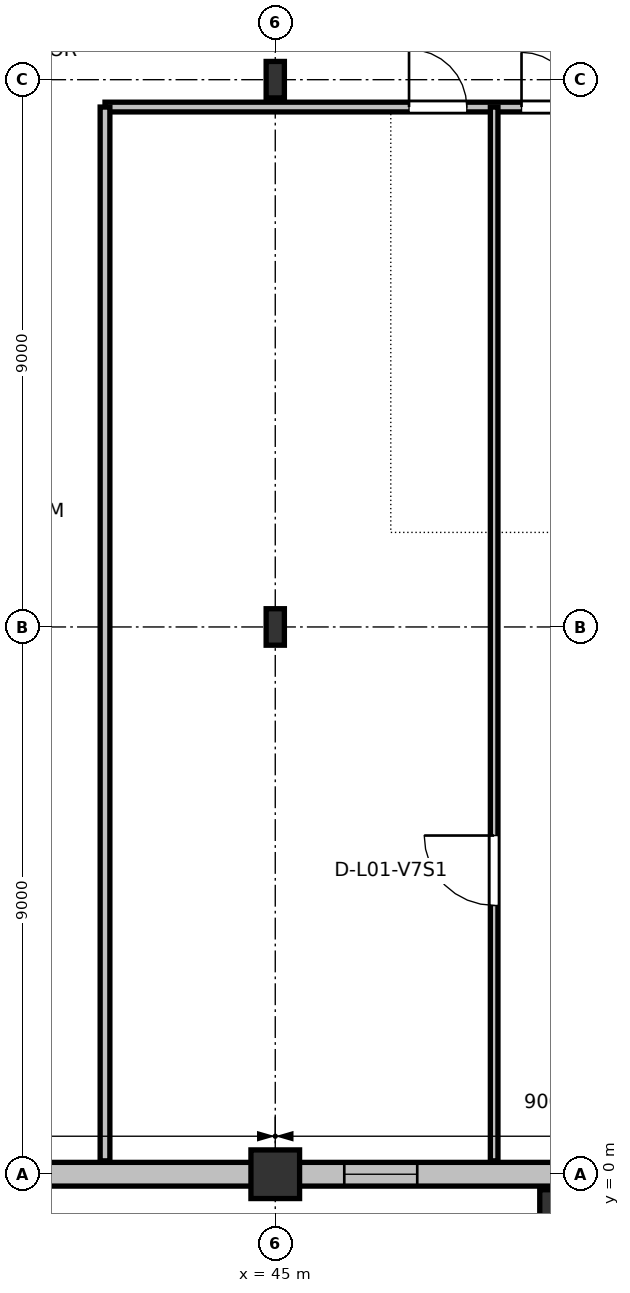
"""IFC4 building model, lengths in metres.
Left out: names, types, materials, properties, quantities, classifications, styles, units other than length and angle.
Written with IfcOpenShell. Run it as: python <this file> out.ifc"""

import sys

from ifc_helpers import new_model, si_unit, direction, frame, frame_2d, origin, origin_2d, place, context, subcontext, project, spatial, rectangle, i_section, extrude, element, fill, save


model = new_model("IFC4")
c1 = context("Model", 3, precision=1e-05, world=origin(), true_north=direction((0.0, 1.0)))
c2 = subcontext(c1, "Body", "Model", "MODEL_VIEW")
j1 = project(units=[si_unit("LENGTHUNIT", "METRE"), si_unit("PLANEANGLEUNIT", "RADIAN")], contexts=[c1])
p1 = place(None, origin())
s1 = spatial("IfcSite", under=j1, at=p1, CompositionType="ELEMENT")
p2 = place(p1, origin())
s2 = spatial("IfcBuilding", under=s1, at=p2, CompositionType="ELEMENT")
p3 = place(p2, frame((0.0, 0.0, 5.4)))
s3 = spatial("IfcBuildingStorey", under=s2, at=p3, CompositionType="ELEMENT", Elevation=5.4)
p4 = place(p3, frame((49.5, -0.48, 0.0), z_axis=(0.0, 0.0, 1.0), x_axis=(1.0, 0.0, 0.0)))
e1 = element("IfcColumn", 1, at=p4, inside=s3, PredefinedType="PILASTER", context=c2, shape_type="SweptSolid", body=[
    extrude(rectangle(XDim=0.3, YDim=0.45, at=origin_2d()), origin(), (0.0, 0.0, 1.0), 4.8),
])
p5 = place(p3, frame((45.0, 0.0, 0.0), z_axis=(0.0, 0.0, 1.0), x_axis=(1.0, 0.0, 0.0)))
e2 = element("IfcColumn", 2, at=p5, inside=s3, PredefinedType="COLUMN", context=c2, shape_type="SweptSolid", body=[
    extrude(rectangle(XDim=0.8, YDim=0.8, at=origin_2d()), origin(), (0.0, 0.0, 1.0), 4.8),
])
for number, where, z_axis, x_axis in (
    (3, (45.0, 9.0, 0.0), (0.0, 0.0, 1.0), (1.0, 0.0, 0.0)),
    (4, (45.0, 18.0, 0.0), (0.0, 0.0, 1.0), (1.0, 0.0, 0.0)),
):
    element("IfcColumn", number, at=place(p3, frame(where, z_axis=z_axis, x_axis=x_axis)), inside=s3, PredefinedType="COLUMN", context=c2, shape_type="SweptSolid", body=[
        extrude(i_section(OverallWidth=0.3, OverallDepth=0.6, WebThickness=0.015, FlangeThickness=0.03, at=origin_2d()), origin(), (0.0, 0.0, 1.0), 4.8),
    ])
p6 = place(p3, frame((36.385, 0.0, 0.0), z_axis=(0.0, 0.0, 1.0), x_axis=(1.0, 0.0, 0.0)))
e5 = element("IfcWall", 5, at=p6, inside=s3, PredefinedType="STANDARD", context=c2, shape_type="SweptSolid", body=[
    extrude(rectangle(XDim=8.23, YDim=0.39, at=frame_2d((4.115, 0.0))), origin(), (0.0, 0.0, 1.0), 3.495),
])
p7 = place(p6, frame((0.75, 0.0, 0.9)))
e6 = element("IfcOpeningElement", 6, at=p7, cuts=e5, PredefinedType="OPENING", context=c2, shape_type="SweptSolid", body=[
    extrude(rectangle(XDim=1.3, YDim=1.85, at=frame_2d((0.65, 0.925))), frame((0.0, 0.205, 0.0), z_axis=(0.0, -1.0, 0.0), x_axis=(1.0, 0.0, 0.0)), (0.0, 0.0, 1.0), 0.41),
])
p8 = place(p3, frame((45.385, 0.0, 0.0), z_axis=(0.0, 0.0, 1.0), x_axis=(1.0, 0.0, 0.0)))
e7 = element("IfcWall", 7, at=p8, inside=s3, PredefinedType="STANDARD", context=c2, shape_type="SweptSolid", body=[
    extrude(rectangle(XDim=8.23, YDim=0.39, at=frame_2d((4.115, 0.0))), origin(), (0.0, 0.0, 1.0), 3.495),
])
p9 = place(p8, frame((0.75, 0.0, 0.9)))
e8 = element("IfcOpeningElement", 8, at=p9, cuts=e7, PredefinedType="OPENING", context=c2, shape_type="SweptSolid", body=[
    extrude(rectangle(XDim=1.2, YDim=1.8, at=frame_2d((0.6, 0.9))), frame((0.0, 0.205, 0.0), z_axis=(0.0, -1.0, 0.0), x_axis=(1.0, 0.0, 0.0)), (0.0, 0.0, 1.0), 0.41),
])
p10 = place(p3, frame((42.2, 17.55, 0.0), z_axis=(0.0, 0.0, 1.0), x_axis=(1.0, 0.0, 0.0)))
e9 = element("IfcWall", 9, at=p10, inside=s3, PredefinedType="PARTITIONING", context=c2, shape_type="SweptSolid", body=[
    extrude(rectangle(XDim=23.6, YDim=0.16, at=frame_2d((11.8, 0.0))), origin(), (0.0, 0.0, 1.0), 4.56),
])
p11 = place(p10, frame((5.0, 0.0, 0.0)))
e10 = element("IfcOpeningElement", 10, at=p11, cuts=e9, PredefinedType="OPENING", context=c2, shape_type="SweptSolid", body=[
    extrude(rectangle(XDim=0.95, YDim=2.12, at=frame_2d((0.475, 1.06))), frame((0.0, 0.09, 0.0), z_axis=(0.0, -1.0, 0.0), x_axis=(1.0, 0.0, 0.0)), (0.0, 0.0, 1.0), 0.18),
])
p12 = place(p10, frame((6.85, 0.0, 0.0)))
e11 = element("IfcOpeningElement", 11, at=p12, cuts=e9, PredefinedType="OPENING", context=c2, shape_type="SweptSolid", body=[
    extrude(rectangle(XDim=0.9, YDim=2.1, at=frame_2d((0.45, 1.05))), frame((0.0, 0.09, 0.0), z_axis=(0.0, -1.0, 0.0), x_axis=(1.0, 0.0, 0.0)), (0.0, 0.0, 1.0), 0.18),
])
p13 = place(p10, frame((16.85, 0.0, 0.0)))
e12 = element("IfcOpeningElement", 12, at=p13, cuts=e9, PredefinedType="OPENING", context=c2, shape_type="SweptSolid", body=[
    extrude(rectangle(XDim=1.2, YDim=2.18, at=frame_2d((0.6, 1.09))), frame((0.0, 0.09, 0.0), z_axis=(0.0, -1.0, 0.0), x_axis=(1.0, 0.0, 0.0)), (0.0, 0.0, 1.0), 0.18),
])
p14 = place(p3, frame((42.2, 0.22, 0.0), z_axis=(0.0, 0.0, 1.0), x_axis=(0.0, 1.0, 0.0)))
e13 = element("IfcWall", 13, at=p14, inside=s3, PredefinedType="PARTITIONING", context=c2, shape_type="SweptSolid", body=[
    extrude(rectangle(XDim=17.33, YDim=0.16, at=frame_2d((8.665, 0.0))), origin(), (0.0, 0.0, 1.0), 4.56),
])
p15 = place(p3, frame((48.6, 0.22, 0.0), z_axis=(0.0, 0.0, 1.0), x_axis=(0.0, 1.0, 0.0)))
e14 = element("IfcWall", 14, at=p15, inside=s3, PredefinedType="PARTITIONING", context=c2, shape_type="SweptSolid", body=[
    extrude(rectangle(XDim=17.33, YDim=0.125, at=frame_2d((8.665, 0.0))), origin(), (0.0, 0.0, 1.0), 4.56),
])
p16 = place(p15, frame((4.2, 0.0, 0.0)))
e15 = element("IfcOpeningElement", 15, at=p16, cuts=e14, PredefinedType="OPENING", context=c2, shape_type="SweptSolid", body=[
    extrude(rectangle(XDim=1.15, YDim=2.15, at=frame_2d((0.575, 1.075))), frame((0.0, 0.073, 0.0), z_axis=(0.0, -1.0, 0.0), x_axis=(1.0, 0.0, 0.0)), (0.0, 0.0, 1.0), 0.145),
])
p17 = place(p9, origin())
e16 = element("IfcWindow", 16, at=p17, inside=s3, PartitioningType="SINGLE_PANEL", PredefinedType="WINDOW", context=c2, shape_type="SweptSolid", body=[
    extrude(rectangle(XDim=1.2, YDim=1.8, at=frame_2d((0.6, 0.9))), frame((0.0, 0.03, 0.0), z_axis=(0.0, -1.0, 0.0), x_axis=(1.0, 0.0, 0.0)), (0.0, 0.0, 1.0), 0.06),
])
fill(e8, e16)
p18 = place(p11, origin())
e17 = element("IfcDoor", 17, at=p18, inside=s3, OperationType="SINGLE_SWING_LEFT", PredefinedType="DOOR", context=c2, shape_type="SweptSolid", body=[
    extrude(rectangle(XDim=0.95, YDim=2.12, at=frame_2d((0.475, 1.06))), frame((0.0, 0.025, 0.0), z_axis=(0.0, -1.0, 0.0), x_axis=(1.0, 0.0, 0.0)), (0.0, 0.0, 1.0), 0.05),
])
fill(e10, e17)
p19 = place(p16, origin())
e18 = element("IfcDoor", 18, at=p19, inside=s3, OperationType="SINGLE_SWING_RIGHT", PredefinedType="DOOR", context=c2, shape_type="SweptSolid", body=[
    extrude(rectangle(XDim=1.15, YDim=2.15, at=frame_2d((0.575, 1.075))), frame((0.0, 0.025, 0.0), z_axis=(0.0, -1.0, 0.0), x_axis=(1.0, 0.0, 0.0)), (0.0, 0.0, 1.0), 0.05),
])
fill(e15, e18)
p20 = place(p12, origin())
e19 = element("IfcDoor", 19, at=p20, inside=s3, OperationType="SINGLE_SWING_LEFT", PredefinedType="DOOR", context=c2, shape_type="SweptSolid", body=[
    extrude(rectangle(XDim=0.9, YDim=2.1, at=frame_2d((0.45, 1.05))), frame((0.0, 0.025, 0.0), z_axis=(0.0, -1.0, 0.0), x_axis=(1.0, 0.0, 0.0)), (0.0, 0.0, 1.0), 0.05),
])
fill(e11, e19)
save(model, sys.argv[1])
